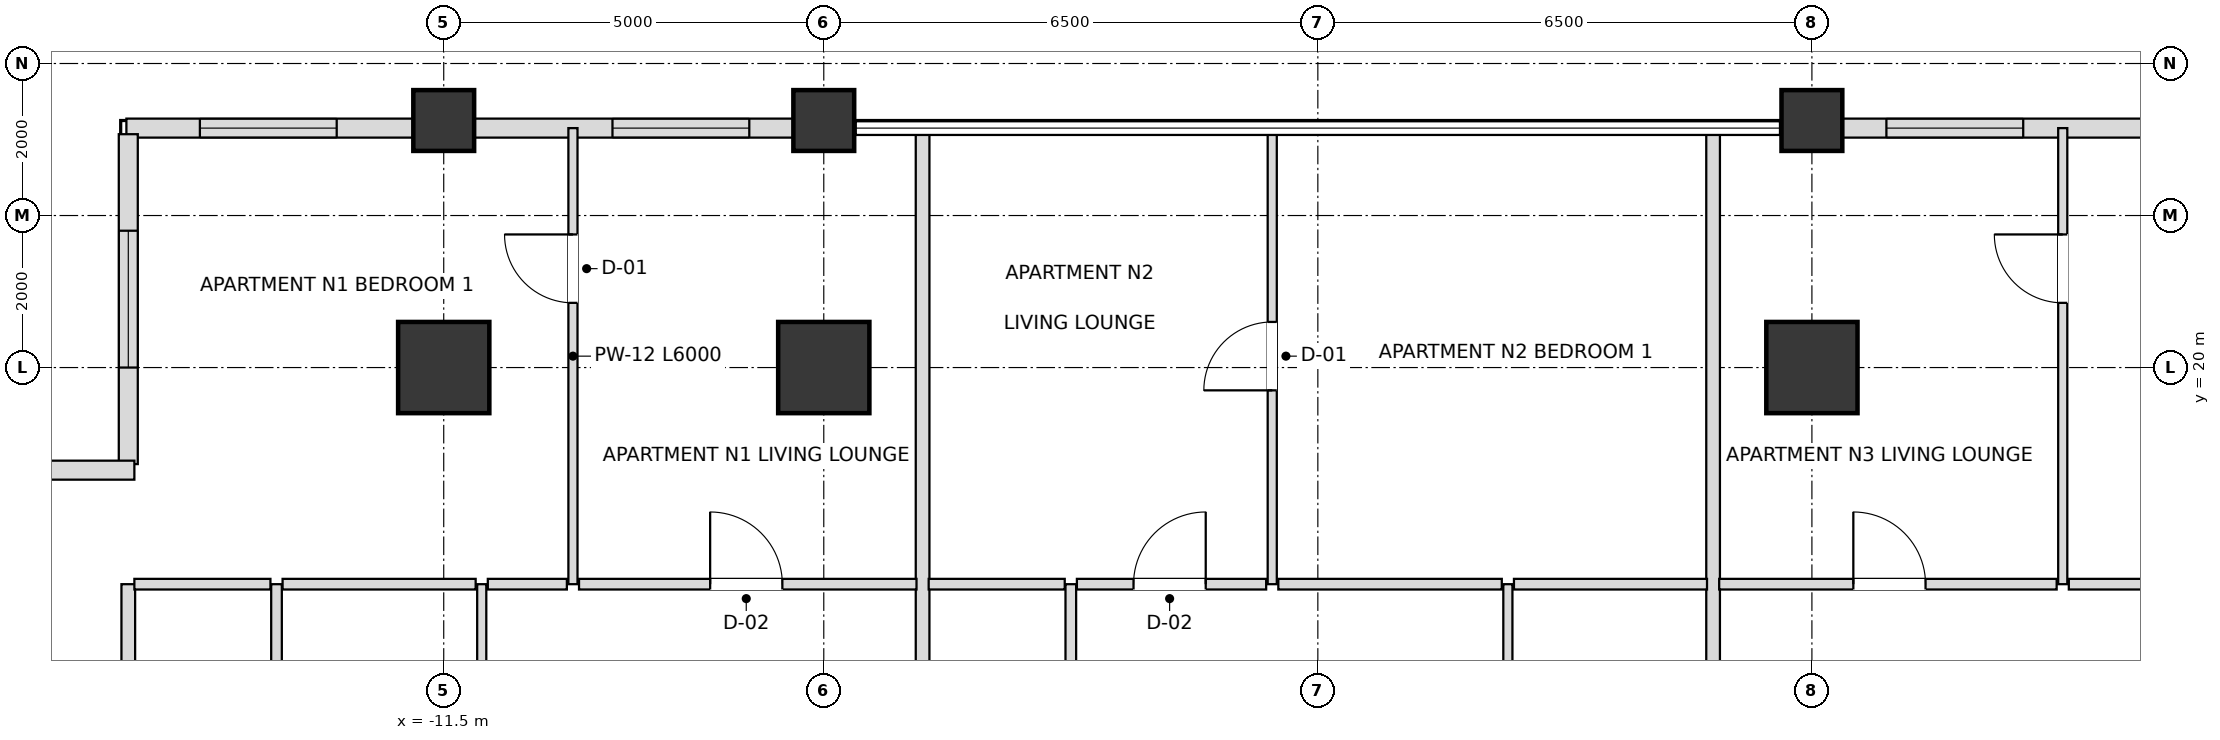
"""IFC4 building model, lengths in metres.
Left out: names, types, materials, properties, quantities, classifications, styles, units other than length and angle.
Written with IfcOpenShell. Run it as: python <this file> out.ifc"""

import sys

from ifc_helpers import new_model, si_unit, direction, frame, frame_2d, origin, origin_2d, place, context, subcontext, project, spatial, rectangle, extrude, element, fill, save


model = new_model("IFC4")
c1 = context("Model", 3, precision=1e-05, world=origin(), true_north=direction((0.0, 1.0)))
c2 = subcontext(c1, "Body", "Model", "MODEL_VIEW")
j1 = project(units=[si_unit("LENGTHUNIT", "METRE"), si_unit("PLANEANGLEUNIT", "RADIAN")], contexts=[c1])
p1 = place(None, origin())
s1 = spatial("IfcSite", under=j1, at=p1, CompositionType="ELEMENT")
p2 = place(p1, origin())
s2 = spatial("IfcBuilding", under=s1, at=p2, CompositionType="ELEMENT")
p3 = place(p2, frame((0.0, 0.0, 106.2)))
s3 = spatial("IfcBuildingStorey", under=s2, at=p3, CompositionType="ELEMENT", Elevation=106.2)
for number, where, z_axis, x_axis in (
    (1, (6.5, 20.0, 0.0), (0.0, 0.0, 1.0), (1.0, 0.0, 0.0)),
    (2, (-6.5, 20.0, 0.0), (0.0, 0.0, 1.0), (1.0, 0.0, 0.0)),
    (3, (-11.5, 20.0, 0.0), (0.0, 0.0, 1.0), (1.0, 0.0, 0.0)),
):
    element("IfcColumn", number, at=place(p3, frame(where, z_axis=z_axis, x_axis=x_axis)), inside=s3, PredefinedType="USERDEFINED", context=c2, shape_type="SweptSolid", body=[
        extrude(rectangle(XDim=1.2, YDim=1.2, at=origin_2d()), origin(), (0.0, 0.0, 1.0), 3.6),
    ])
for number, where, z_axis, x_axis in (
    (4, (-11.5, 23.25, 0.0), (0.0, 0.0, 1.0), (1.0, 0.0, 0.0)),
    (5, (-6.5, 23.25, 0.0), (0.0, 0.0, 1.0), (1.0, 0.0, 0.0)),
    (6, (6.5, 23.25, 0.0), (0.0, 0.0, 1.0), (1.0, 0.0, 0.0)),
):
    element("IfcColumn", number, at=place(p3, frame(where, z_axis=z_axis, x_axis=x_axis)), inside=s3, PredefinedType="COLUMN", context=c2, shape_type="SweptSolid", body=[
        extrude(rectangle(XDim=0.8, YDim=0.8, at=origin_2d()), origin(), (0.0, 0.0, 1.0), 3.6),
    ])
p4 = place(p3, frame((11.105, 23.15, 0.0), z_axis=(0.0, 0.0, 1.0), x_axis=(-1.0, 0.0, 0.0)))
e7 = element("IfcWall", 7, at=p4, inside=s3, PredefinedType="SOLIDWALL", context=c2, shape_type="SweptSolid", body=[
    extrude(rectangle(XDim=4.21, YDim=0.25, at=frame_2d((2.105, 0.0))), origin(), (0.0, 0.0, 1.0), 2.736),
])
p5 = place(p4, frame((1.825, 0.0, 0.72)))
e8 = element("IfcOpeningElement", 8, at=p5, cuts=e7, PredefinedType="OPENING", context=c2, shape_type="SweptSolid", body=[
    extrude(rectangle(XDim=1.8, YDim=1.68, at=frame_2d((0.9, 0.84))), frame((0.0, 0.135, 0.0), z_axis=(0.0, -1.0, 0.0), x_axis=(1.0, 0.0, 0.0)), (0.0, 0.0, 1.0), 0.27),
])
p6 = place(p3, frame((-6.895, 23.15, 0.0), z_axis=(0.0, 0.0, 1.0), x_axis=(-1.0, 0.0, 0.0)))
e9 = element("IfcWall", 9, at=p6, inside=s3, PredefinedType="SOLIDWALL", context=c2, shape_type="SweptSolid", body=[
    extrude(rectangle(XDim=4.21, YDim=0.25, at=frame_2d((2.105, 0.0))), origin(), (0.0, 0.0, 1.0), 2.736),
])
p7 = place(p6, frame((0.585, 0.0, 0.72)))
e10 = element("IfcOpeningElement", 10, at=p7, cuts=e9, PredefinedType="OPENING", context=c2, shape_type="SweptSolid", body=[
    extrude(rectangle(XDim=1.8, YDim=1.68, at=frame_2d((0.9, 0.84))), frame((0.0, 0.135, 0.0), z_axis=(0.0, -1.0, 0.0), x_axis=(1.0, 0.0, 0.0)), (0.0, 0.0, 1.0), 0.27),
])
p8 = place(p3, frame((-11.895, 23.15, 0.0), z_axis=(0.0, 0.0, 1.0), x_axis=(-1.0, 0.0, 0.0)))
e11 = element("IfcWall", 11, at=p8, inside=s3, PredefinedType="SOLIDWALL", context=c2, shape_type="SweptSolid", body=[
    extrude(rectangle(XDim=3.78, YDim=0.25, at=frame_2d((1.89, 0.0))), origin(), (0.0, 0.0, 1.0), 2.736),
])
p9 = place(p8, frame((1.013, 0.0, 0.72)))
e12 = element("IfcOpeningElement", 12, at=p9, cuts=e11, PredefinedType="OPENING", context=c2, shape_type="SweptSolid", body=[
    extrude(rectangle(XDim=1.8, YDim=1.68, at=frame_2d((0.9, 0.84))), frame((0.0, 0.135, 0.0), z_axis=(0.0, -1.0, 0.0), x_axis=(1.0, 0.0, 0.0)), (0.0, 0.0, 1.0), 0.27),
])
p10 = place(p3, frame((-15.65, 23.07, 0.0), z_axis=(0.0, 0.0, 1.0), x_axis=(0.0, -1.0, 0.0)))
e13 = element("IfcWall", 13, at=p10, inside=s3, PredefinedType="SOLIDWALL", context=c2, shape_type="SweptSolid", body=[
    extrude(rectangle(XDim=4.34, YDim=0.25, at=frame_2d((2.17, 0.0))), origin(), (0.0, 0.0, 1.0), 2.736),
])
p11 = place(p10, frame((1.27, 0.0, 0.72)))
e14 = element("IfcOpeningElement", 14, at=p11, cuts=e13, PredefinedType="OPENING", context=c2, shape_type="SweptSolid", body=[
    extrude(rectangle(XDim=1.8, YDim=1.68, at=frame_2d((0.9, 0.84))), frame((0.0, 0.135, 0.0), z_axis=(0.0, -1.0, 0.0), x_axis=(1.0, 0.0, 0.0)), (0.0, 0.0, 1.0), 0.27),
])
p12 = place(p3, frame((-15.57, 18.65, 0.0), z_axis=(0.0, 0.0, 1.0), x_axis=(-1.0, 0.0, 0.0)))
e15 = element("IfcWall", 15, at=p12, inside=s3, PredefinedType="SOLIDWALL", context=c2, shape_type="SweptSolid", body=[
    extrude(rectangle(XDim=4.66, YDim=0.25, at=frame_2d((2.33, 0.0))), origin(), (0.0, 0.0, 1.0), 2.736),
])
p13 = place(p12, frame((1.43, 0.0, 0.72)))
e16 = element("IfcOpeningElement", 16, at=p13, cuts=e15, PredefinedType="OPENING", context=c2, shape_type="SweptSolid", body=[
    extrude(rectangle(XDim=1.8, YDim=1.68, at=frame_2d((0.9, 0.84))), frame((0.0, 0.135, 0.0), z_axis=(0.0, -1.0, 0.0), x_axis=(1.0, 0.0, 0.0)), (0.0, 0.0, 1.0), 0.27),
])
p14 = place(p3, frame((-15.65, 9.3, 0.0), z_axis=(0.0, 0.0, 1.0), x_axis=(0.0, 1.0, 0.0)))
e17 = element("IfcWall", 17, at=p14, inside=s3, PredefinedType="PARTITIONING", context=c2, shape_type="SweptSolid", body=[
    extrude(rectangle(XDim=7.85, YDim=0.18, at=frame_2d((3.925, 0.0))), origin(), (0.0, 0.0, 1.0), 2.736),
])
p15 = place(p3, frame((-13.7, 9.3, 0.0), z_axis=(0.0, 0.0, 1.0), x_axis=(0.0, 1.0, 0.0)))
e18 = element("IfcWall", 18, at=p15, inside=s3, PredefinedType="PARTITIONING", context=c2, shape_type="SweptSolid", body=[
    extrude(rectangle(XDim=7.85, YDim=0.14, at=frame_2d((3.925, 0.0))), origin(), (0.0, 0.0, 1.0), 2.736),
])
p16 = place(p15, frame((3.47, 0.0, 0.0)))
e19 = element("IfcOpeningElement", 19, at=p16, cuts=e18, PredefinedType="OPENING", context=c2, shape_type="SweptSolid", body=[
    extrude(rectangle(XDim=0.9, YDim=2.1, at=frame_2d((0.45, 1.05))), frame((0.0, 0.08, 0.0), z_axis=(0.0, -1.0, 0.0), x_axis=(1.0, 0.0, 0.0)), (0.0, 0.0, 1.0), 0.16),
])
p17 = place(p3, frame((-11.0, 9.3, 0.0), z_axis=(0.0, 0.0, 1.0), x_axis=(0.0, 1.0, 0.0)))
e20 = element("IfcWall", 20, at=p17, inside=s3, PredefinedType="PARTITIONING", context=c2, shape_type="SweptSolid", body=[
    extrude(rectangle(XDim=7.85, YDim=0.12, at=frame_2d((3.925, 0.0))), origin(), (0.0, 0.0, 1.0), 2.816),
])
p18 = place(p17, frame((4.219, 0.0, 0.0)))
e21 = element("IfcOpeningElement", 21, at=p18, cuts=e20, PredefinedType="OPENING", context=c2, shape_type="SweptSolid", body=[
    extrude(rectangle(XDim=0.95, YDim=2.1, at=frame_2d((0.475, 1.05))), frame((0.0, 0.07, 0.0), z_axis=(0.0, -1.0, 0.0), x_axis=(1.0, 0.0, 0.0)), (0.0, 0.0, 1.0), 0.14),
])
p19 = place(p3, frame((-9.8, 17.15, 0.0), z_axis=(0.0, 0.0, 1.0), x_axis=(0.0, 1.0, 0.0)))
e22 = element("IfcWall", 22, at=p19, inside=s3, PredefinedType="PARTITIONING", context=c2, shape_type="SweptSolid", body=[
    extrude(rectangle(XDim=6.0, YDim=0.12, at=frame_2d((3.0, 0.0))), origin(), (0.0, 0.0, 1.0), 2.816),
])
p20 = place(p19, frame((3.701, 0.0, 0.0)))
e23 = element("IfcOpeningElement", 23, at=p20, cuts=e22, PredefinedType="OPENING", context=c2, shape_type="SweptSolid", body=[
    extrude(rectangle(XDim=0.9, YDim=2.1, at=frame_2d((0.45, 1.05))), frame((0.0, 0.07, 0.0), z_axis=(0.0, -1.0, 0.0), x_axis=(1.0, 0.0, 0.0)), (0.0, 0.0, 1.0), 0.14),
])
p21 = place(p3, frame((-5.2, 9.3, 0.0), z_axis=(0.0, 0.0, 1.0), x_axis=(0.0, 1.0, 0.0)))
e24 = element("IfcWall", 24, at=p21, inside=s3, PredefinedType="PARTITIONING", context=c2, shape_type="SweptSolid", body=[
    extrude(rectangle(XDim=13.85, YDim=0.18, at=frame_2d((6.925, 0.0))), origin(), (0.0, 0.0, 1.0), 2.816),
])
p22 = place(p3, frame((-3.25, 9.3, 0.0), z_axis=(0.0, 0.0, 1.0), x_axis=(0.0, 1.0, 0.0)))
e25 = element("IfcWall", 25, at=p22, inside=s3, PredefinedType="PARTITIONING", context=c2, shape_type="SweptSolid", body=[
    extrude(rectangle(XDim=7.85, YDim=0.14, at=frame_2d((3.925, 0.0))), origin(), (0.0, 0.0, 1.0), 3.38),
])
p23 = place(p22, frame((3.47, 0.0, 0.0)))
e26 = element("IfcOpeningElement", 26, at=p23, cuts=e25, PredefinedType="OPENING", context=c2, shape_type="SweptSolid", body=[
    extrude(rectangle(XDim=0.9, YDim=2.1, at=frame_2d((0.45, 1.05))), frame((0.0, 0.08, 0.0), z_axis=(0.0, -1.0, 0.0), x_axis=(1.0, 0.0, 0.0)), (0.0, 0.0, 1.0), 0.16),
])
p24 = place(p3, frame((-0.6, 17.15, 0.0), z_axis=(0.0, 0.0, 1.0), x_axis=(0.0, 1.0, 0.0)))
e27 = element("IfcWall", 27, at=p24, inside=s3, PredefinedType="PARTITIONING", context=c2, shape_type="SweptSolid", body=[
    extrude(rectangle(XDim=6.0, YDim=0.12, at=frame_2d((3.0, 0.0))), origin(), (0.0, 0.0, 1.0), 2.816),
])
p25 = place(p24, frame((2.55, 0.0, 0.0)))
e28 = element("IfcOpeningElement", 28, at=p25, cuts=e27, PredefinedType="OPENING", context=c2, shape_type="SweptSolid", body=[
    extrude(rectangle(XDim=0.9, YDim=2.1, at=frame_2d((0.45, 1.05))), frame((0.0, 0.07, 0.0), z_axis=(0.0, -1.0, 0.0), x_axis=(1.0, 0.0, 0.0)), (0.0, 0.0, 1.0), 0.14),
])
p26 = place(p3, frame((2.5, 9.3, 0.0), z_axis=(0.0, 0.0, 1.0), x_axis=(0.0, 1.0, 0.0)))
e29 = element("IfcWall", 29, at=p26, inside=s3, PredefinedType="PARTITIONING", context=c2, shape_type="SweptSolid", body=[
    extrude(rectangle(XDim=7.85, YDim=0.12, at=frame_2d((3.925, 0.0))), origin(), (0.0, 0.0, 1.0), 3.38),
])
p27 = place(p26, frame((3.445, 0.0, 0.0)))
e30 = element("IfcOpeningElement", 30, at=p27, cuts=e29, PredefinedType="OPENING", context=c2, shape_type="SweptSolid", body=[
    extrude(rectangle(XDim=0.95, YDim=2.1, at=frame_2d((0.475, 1.05))), frame((0.0, 0.07, 0.0), z_axis=(0.0, -1.0, 0.0), x_axis=(1.0, 0.0, 0.0)), (0.0, 0.0, 1.0), 0.14),
])
p28 = place(p3, frame((5.2, 9.3, 0.0), z_axis=(0.0, 0.0, 1.0), x_axis=(0.0, 1.0, 0.0)))
e31 = element("IfcWall", 31, at=p28, inside=s3, PredefinedType="PARTITIONING", context=c2, shape_type="SweptSolid", body=[
    extrude(rectangle(XDim=13.85, YDim=0.18, at=frame_2d((6.925, 0.0))), origin(), (0.0, 0.0, 1.0), 2.816),
])
p29 = place(p3, frame((9.8, 17.15, 0.0), z_axis=(0.0, 0.0, 1.0), x_axis=(0.0, 1.0, 0.0)))
e32 = element("IfcWall", 32, at=p29, inside=s3, PredefinedType="PARTITIONING", context=c2, shape_type="SweptSolid", body=[
    extrude(rectangle(XDim=6.0, YDim=0.12, at=frame_2d((3.0, 0.0))), origin(), (0.0, 0.0, 1.0), 2.816),
])
p30 = place(p29, frame((3.701, 0.0, 0.0)))
e33 = element("IfcOpeningElement", 33, at=p30, cuts=e32, PredefinedType="OPENING", context=c2, shape_type="SweptSolid", body=[
    extrude(rectangle(XDim=0.9, YDim=2.1, at=frame_2d((0.45, 1.05))), frame((0.0, 0.07, 0.0), z_axis=(0.0, -1.0, 0.0), x_axis=(1.0, 0.0, 0.0)), (0.0, 0.0, 1.0), 0.14),
])
p31 = place(p3, frame((-15.57, 17.15, 0.0), z_axis=(0.0, 0.0, 1.0), x_axis=(1.0, 0.0, 0.0)))
e34 = element("IfcWall", 34, at=p31, inside=s3, PredefinedType="PARTITIONING", context=c2, shape_type="SweptSolid", body=[
    extrude(rectangle(XDim=1.79, YDim=0.14, at=frame_2d((0.895, 0.0))), origin(), (0.0, 0.0, 1.0), 2.736),
])
p32 = place(p3, frame((-13.62, 17.15, 0.0), z_axis=(0.0, 0.0, 1.0), x_axis=(1.0, 0.0, 0.0)))
e35 = element("IfcWall", 35, at=p32, inside=s3, PredefinedType="PARTITIONING", context=c2, shape_type="SweptSolid", body=[
    extrude(rectangle(XDim=2.54, YDim=0.14, at=frame_2d((1.27, 0.0))), origin(), (0.0, 0.0, 1.0), 2.736),
])
p33 = place(p3, frame((-10.92, 17.15, 0.0), z_axis=(0.0, 0.0, 1.0), x_axis=(1.0, 0.0, 0.0)))
e36 = element("IfcWall", 36, at=p33, inside=s3, PredefinedType="PARTITIONING", context=c2, shape_type="SweptSolid", body=[
    extrude(rectangle(XDim=1.04, YDim=0.14, at=frame_2d((0.52, 0.0))), origin(), (0.0, 0.0, 1.0), 3.38),
])
p34 = place(p3, frame((-9.72, 17.15, 0.0), z_axis=(0.0, 0.0, 1.0), x_axis=(1.0, 0.0, 0.0)))
e37 = element("IfcWall", 37, at=p34, inside=s3, PredefinedType="PARTITIONING", context=c2, shape_type="SweptSolid", body=[
    extrude(rectangle(XDim=4.44, YDim=0.14, at=frame_2d((2.22, 0.0))), origin(), (0.0, 0.0, 1.0), 2.816),
])
p35 = place(p34, frame((1.725, 0.0, 0.0)))
e38 = element("IfcOpeningElement", 38, at=p35, cuts=e37, PredefinedType="OPENING", context=c2, shape_type="SweptSolid", body=[
    extrude(rectangle(XDim=0.95, YDim=2.1, at=frame_2d((0.475, 1.05))), frame((0.0, 0.08, 0.0), z_axis=(0.0, -1.0, 0.0), x_axis=(1.0, 0.0, 0.0)), (0.0, 0.0, 1.0), 0.16),
])
p36 = place(p3, frame((-5.12, 17.15, 0.0), z_axis=(0.0, 0.0, 1.0), x_axis=(1.0, 0.0, 0.0)))
e39 = element("IfcWall", 39, at=p36, inside=s3, PredefinedType="PARTITIONING", context=c2, shape_type="SweptSolid", body=[
    extrude(rectangle(XDim=1.79, YDim=0.14, at=frame_2d((0.895, 0.0))), origin(), (0.0, 0.0, 1.0), 3.38),
])
p37 = place(p3, frame((-3.17, 17.15, 0.0), z_axis=(0.0, 0.0, 1.0), x_axis=(1.0, 0.0, 0.0)))
e40 = element("IfcWall", 40, at=p37, inside=s3, PredefinedType="PARTITIONING", context=c2, shape_type="SweptSolid", body=[
    extrude(rectangle(XDim=2.49, YDim=0.14, at=frame_2d((1.245, 0.0))), origin(), (0.0, 0.0, 1.0), 3.38),
])
p38 = place(p37, frame((0.745, 0.0, 0.0)))
e41 = element("IfcOpeningElement", 41, at=p38, cuts=e40, PredefinedType="OPENING", context=c2, shape_type="SweptSolid", body=[
    extrude(rectangle(XDim=0.95, YDim=2.1, at=frame_2d((0.475, 1.05))), frame((0.0, 0.08, 0.0), z_axis=(0.0, -1.0, 0.0), x_axis=(1.0, 0.0, 0.0)), (0.0, 0.0, 1.0), 0.16),
])
p39 = place(p3, frame((-0.52, 17.15, 0.0), z_axis=(0.0, 0.0, 1.0), x_axis=(1.0, 0.0, 0.0)))
e42 = element("IfcWall", 42, at=p39, inside=s3, PredefinedType="PARTITIONING", context=c2, shape_type="SweptSolid", body=[
    extrude(rectangle(XDim=2.94, YDim=0.14, at=frame_2d((1.47, 0.0))), origin(), (0.0, 0.0, 1.0), 3.38),
])
p40 = place(p3, frame((2.58, 17.15, 0.0), z_axis=(0.0, 0.0, 1.0), x_axis=(1.0, 0.0, 0.0)))
e43 = element("IfcWall", 43, at=p40, inside=s3, PredefinedType="PARTITIONING", context=c2, shape_type="SweptSolid", body=[
    extrude(rectangle(XDim=2.54, YDim=0.14, at=frame_2d((1.27, 0.0))), origin(), (0.0, 0.0, 1.0), 3.38),
])
p41 = place(p3, frame((5.28, 17.15, 0.0), z_axis=(0.0, 0.0, 1.0), x_axis=(1.0, 0.0, 0.0)))
e44 = element("IfcWall", 44, at=p41, inside=s3, PredefinedType="PARTITIONING", context=c2, shape_type="SweptSolid", body=[
    extrude(rectangle(XDim=4.44, YDim=0.14, at=frame_2d((2.22, 0.0))), origin(), (0.0, 0.0, 1.0), 2.816),
])
p42 = place(p41, frame((1.765, 0.0, 0.0)))
e45 = element("IfcOpeningElement", 45, at=p42, cuts=e44, PredefinedType="OPENING", context=c2, shape_type="SweptSolid", body=[
    extrude(rectangle(XDim=0.95, YDim=2.1, at=frame_2d((0.475, 1.05))), frame((0.0, 0.08, 0.0), z_axis=(0.0, -1.0, 0.0), x_axis=(1.0, 0.0, 0.0)), (0.0, 0.0, 1.0), 0.16),
])
p43 = place(p3, frame((9.88, 17.15, 0.0), z_axis=(0.0, 0.0, 1.0), x_axis=(1.0, 0.0, 0.0)))
e46 = element("IfcWall", 46, at=p43, inside=s3, PredefinedType="PARTITIONING", context=c2, shape_type="SweptSolid", body=[
    extrude(rectangle(XDim=1.04, YDim=0.14, at=frame_2d((0.52, 0.0))), origin(), (0.0, 0.0, 1.0), 3.38),
])
p44 = place(p5, origin())
e47 = element("IfcWindow", 47, at=p44, inside=s3, PartitioningType="SINGLE_PANEL", PredefinedType="WINDOW", context=c2, shape_type="SweptSolid", body=[
    extrude(rectangle(XDim=1.8, YDim=1.68, at=frame_2d((0.9, 0.84))), frame((0.0, 0.03, 0.0), z_axis=(0.0, -1.0, 0.0), x_axis=(1.0, 0.0, 0.0)), (0.0, 0.0, 1.0), 0.06),
])
fill(e8, e47)
p45 = place(p7, origin())
e48 = element("IfcWindow", 48, at=p45, inside=s3, PartitioningType="SINGLE_PANEL", PredefinedType="WINDOW", context=c2, shape_type="SweptSolid", body=[
    extrude(rectangle(XDim=1.8, YDim=1.68, at=frame_2d((0.9, 0.84))), frame((0.0, 0.03, 0.0), z_axis=(0.0, -1.0, 0.0), x_axis=(1.0, 0.0, 0.0)), (0.0, 0.0, 1.0), 0.06),
])
fill(e10, e48)
p46 = place(p9, origin())
e49 = element("IfcWindow", 49, at=p46, inside=s3, PartitioningType="SINGLE_PANEL", PredefinedType="WINDOW", context=c2, shape_type="SweptSolid", body=[
    extrude(rectangle(XDim=1.8, YDim=1.68, at=frame_2d((0.9, 0.84))), frame((0.0, 0.03, 0.0), z_axis=(0.0, -1.0, 0.0), x_axis=(1.0, 0.0, 0.0)), (0.0, 0.0, 1.0), 0.06),
])
fill(e12, e49)
p47 = place(p11, origin())
e50 = element("IfcWindow", 50, at=p47, inside=s3, PartitioningType="SINGLE_PANEL", PredefinedType="WINDOW", context=c2, shape_type="SweptSolid", body=[
    extrude(rectangle(XDim=1.8, YDim=1.68, at=frame_2d((0.9, 0.84))), frame((0.0, 0.03, 0.0), z_axis=(0.0, -1.0, 0.0), x_axis=(1.0, 0.0, 0.0)), (0.0, 0.0, 1.0), 0.06),
])
fill(e14, e50)
p48 = place(p35, origin())
e51 = element("IfcDoor", 51, at=p48, inside=s3, OperationType="SINGLE_SWING_LEFT", PredefinedType="DOOR", context=c2, shape_type="SweptSolid", body=[
    extrude(rectangle(XDim=0.95, YDim=2.1, at=frame_2d((0.475, 1.05))), frame((0.0, 0.025, 0.0), z_axis=(0.0, -1.0, 0.0), x_axis=(1.0, 0.0, 0.0)), (0.0, 0.0, 1.0), 0.05),
])
fill(e38, e51)
p49 = place(p20, origin())
e52 = element("IfcDoor", 52, at=p49, inside=s3, OperationType="SINGLE_SWING_RIGHT", PredefinedType="DOOR", context=c2, shape_type="SweptSolid", body=[
    extrude(rectangle(XDim=0.9, YDim=2.1, at=frame_2d((0.45, 1.05))), frame((0.0, 0.025, 0.0), z_axis=(0.0, -1.0, 0.0), x_axis=(1.0, 0.0, 0.0)), (0.0, 0.0, 1.0), 0.05),
])
fill(e23, e52)
p50 = place(p38, origin())
e53 = element("IfcDoor", 53, at=p50, inside=s3, OperationType="SINGLE_SWING_RIGHT", PredefinedType="DOOR", context=c2, shape_type="SweptSolid", body=[
    extrude(rectangle(XDim=0.95, YDim=2.1, at=frame_2d((0.475, 1.05))), frame((0.0, 0.025, 0.0), z_axis=(0.0, -1.0, 0.0), x_axis=(1.0, 0.0, 0.0)), (0.0, 0.0, 1.0), 0.05),
])
fill(e41, e53)
p51 = place(p25, origin())
e54 = element("IfcDoor", 54, at=p51, inside=s3, OperationType="SINGLE_SWING_LEFT", PredefinedType="DOOR", context=c2, shape_type="SweptSolid", body=[
    extrude(rectangle(XDim=0.9, YDim=2.1, at=frame_2d((0.45, 1.05))), frame((0.0, 0.025, 0.0), z_axis=(0.0, -1.0, 0.0), x_axis=(1.0, 0.0, 0.0)), (0.0, 0.0, 1.0), 0.05),
])
fill(e28, e54)
p52 = place(p42, origin())
e55 = element("IfcDoor", 55, at=p52, inside=s3, OperationType="SINGLE_SWING_LEFT", PredefinedType="DOOR", context=c2, shape_type="SweptSolid", body=[
    extrude(rectangle(XDim=0.95, YDim=2.1, at=frame_2d((0.475, 1.05))), frame((0.0, 0.025, 0.0), z_axis=(0.0, -1.0, 0.0), x_axis=(1.0, 0.0, 0.0)), (0.0, 0.0, 1.0), 0.05),
])
fill(e45, e55)
p53 = place(p30, origin())
e56 = element("IfcDoor", 56, at=p53, inside=s3, OperationType="SINGLE_SWING_RIGHT", PredefinedType="DOOR", context=c2, shape_type="SweptSolid", body=[
    extrude(rectangle(XDim=0.9, YDim=2.1, at=frame_2d((0.45, 1.05))), frame((0.0, 0.025, 0.0), z_axis=(0.0, -1.0, 0.0), x_axis=(1.0, 0.0, 0.0)), (0.0, 0.0, 1.0), 0.05),
])
fill(e33, e56)
save(model, sys.argv[1])
